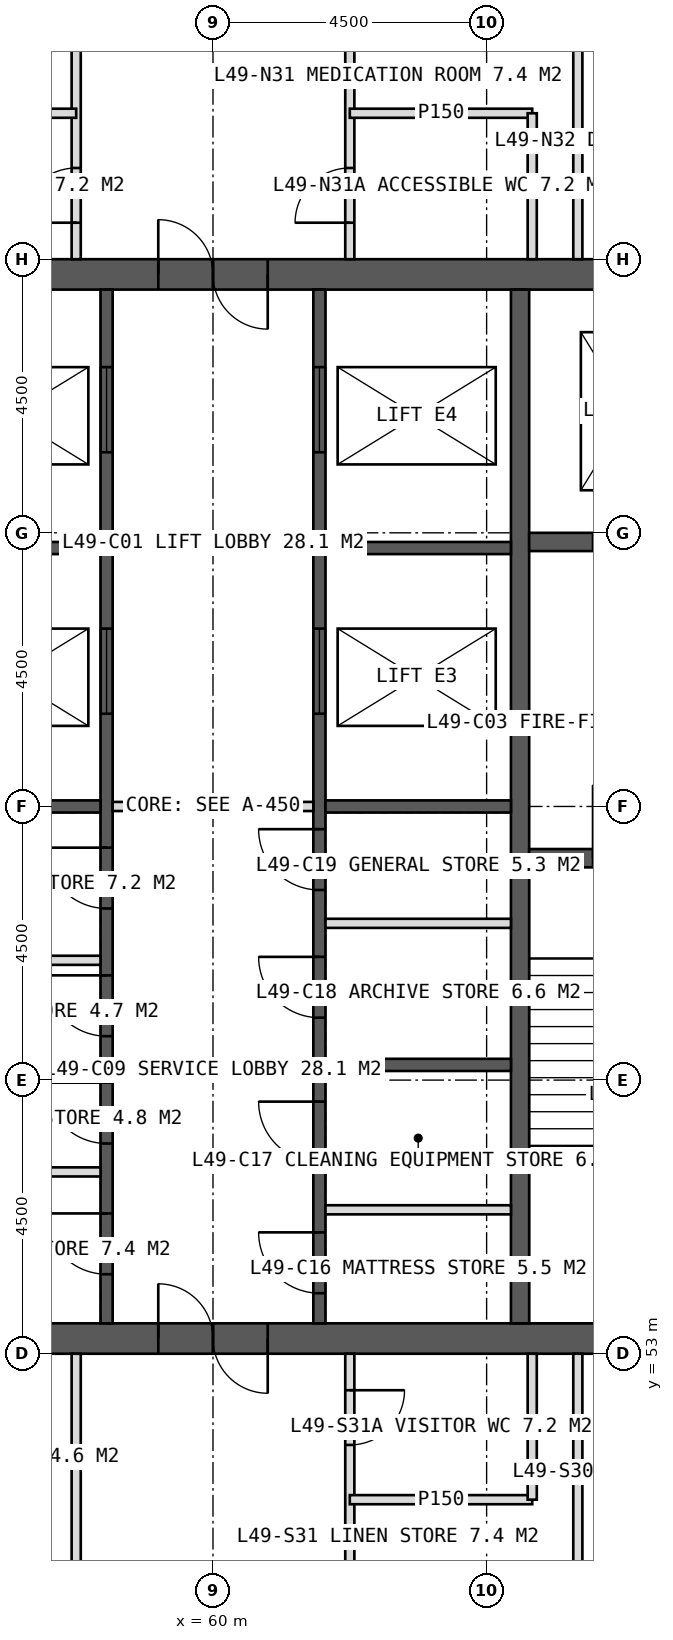
"""IFC4 building model, lengths in metres.
Left out: names, types, materials, properties, quantities, classifications, styles, units other than length and angle.
Written with IfcOpenShell. Run it as: python <this file> out.ifc"""

import sys

from ifc_helpers import new_model, si_unit, direction, frame, frame_2d, origin, place, context, subcontext, project, spatial, rectangle, extrude, element, fill, save


model = new_model("IFC4")
c1 = context("Model", 3, precision=1e-05, world=origin(), true_north=direction((0.0, 1.0)))
c2 = subcontext(c1, "Body", "Model", "MODEL_VIEW")
j1 = project(units=[si_unit("LENGTHUNIT", "METRE"), si_unit("PLANEANGLEUNIT", "RADIAN")], contexts=[c1])
p1 = place(None, origin())
s1 = spatial("IfcSite", under=j1, at=p1, CompositionType="ELEMENT")
p2 = place(p1, origin())
s2 = spatial("IfcBuilding", under=s1, at=p2, CompositionType="ELEMENT")
p3 = place(p2, frame((0.0, 0.0, 205.0)))
s3 = spatial("IfcBuildingStorey", under=s2, at=p3, CompositionType="ELEMENT", Elevation=205.0)
p4 = place(p3, frame((51.0, 70.75, 0.0), z_axis=(0.0, 0.0, 1.0), x_axis=(1.0, 0.0, 0.0)))
e1 = element("IfcWall", 1, at=p4, inside=s3, PredefinedType="SHEAR", context=c2, shape_type="SweptSolid", body=[
    extrude(rectangle(XDim=18.0, YDim=0.5, at=frame_2d((9.0, 0.0))), origin(), (0.0, 0.0, 1.0), 4.0),
])
p5 = place(p4, frame((8.1, 0.0, 0.0)))
e2 = element("IfcOpeningElement", 2, at=p5, cuts=e1, PredefinedType="OPENING", context=c2, shape_type="SweptSolid", body=[
    extrude(rectangle(XDim=1.8, YDim=2.2, at=frame_2d((0.9, 1.1))), frame((0.0, 0.26, 0.0), z_axis=(0.0, -1.0, 0.0), x_axis=(1.0, 0.0, 0.0)), (0.0, 0.0, 1.0), 0.52),
])
p6 = place(p3, frame((51.0, 53.25, 0.0), z_axis=(0.0, 0.0, 1.0), x_axis=(1.0, 0.0, 0.0)))
e3 = element("IfcWall", 3, at=p6, inside=s3, PredefinedType="SHEAR", context=c2, shape_type="SweptSolid", body=[
    extrude(rectangle(XDim=18.0, YDim=0.5, at=frame_2d((9.0, 0.0))), origin(), (0.0, 0.0, 1.0), 4.0),
])
p7 = place(p6, frame((8.1, 0.0, 0.0)))
e4 = element("IfcOpeningElement", 4, at=p7, cuts=e3, PredefinedType="OPENING", context=c2, shape_type="SweptSolid", body=[
    extrude(rectangle(XDim=1.8, YDim=2.2, at=frame_2d((0.9, 1.1))), frame((0.0, 0.26, 0.0), z_axis=(0.0, -1.0, 0.0), x_axis=(1.0, 0.0, 0.0)), (0.0, 0.0, 1.0), 0.52),
])
p8 = place(p3, frame((65.05, 53.5, 0.0), z_axis=(0.0, 0.0, 1.0), x_axis=(0.0, 1.0, 0.0)))
e5 = element("IfcWall", 5, at=p8, inside=s3, PredefinedType="SHEAR", context=c2, shape_type="SweptSolid", body=[
    extrude(rectangle(XDim=17.0, YDim=0.3, at=frame_2d((8.5, 0.0))), origin(), (0.0, 0.0, 1.0), 4.0),
])
p9 = place(p3, frame((58.25, 53.5, 0.0), z_axis=(0.0, 0.0, 1.0), x_axis=(0.0, 1.0, 0.0)))
e6 = element("IfcWall", 6, at=p9, inside=s3, PredefinedType="SHEAR", context=c2, shape_type="SweptSolid", body=[
    extrude(rectangle(XDim=17.0, YDim=0.2, at=frame_2d((8.5, 0.0))), origin(), (0.0, 0.0, 1.0), 4.0),
])
p10 = place(p9, frame((0.808, 0.0, 0.0)))
e7 = element("IfcOpeningElement", 7, at=p10, cuts=e6, PredefinedType="OPENING", context=c2, shape_type="SweptSolid", body=[
    extrude(rectangle(XDim=1.0, YDim=2.1, at=frame_2d((0.5, 1.05))), frame((0.0, 0.11, 0.0), z_axis=(0.0, -1.0, 0.0), x_axis=(1.0, 0.0, 0.0)), (0.0, 0.0, 1.0), 0.22),
])
p11 = place(p9, frame((2.958, 0.0, 0.0)))
e8 = element("IfcOpeningElement", 8, at=p11, cuts=e6, PredefinedType="OPENING", context=c2, shape_type="SweptSolid", body=[
    extrude(rectangle(XDim=1.0, YDim=2.1, at=frame_2d((0.5, 1.05))), frame((0.0, 0.11, 0.0), z_axis=(0.0, -1.0, 0.0), x_axis=(1.0, 0.0, 0.0)), (0.0, 0.0, 1.0), 0.22),
])
p12 = place(p9, frame((4.722, 0.0, 0.0)))
e9 = element("IfcOpeningElement", 9, at=p12, cuts=e6, PredefinedType="OPENING", context=c2, shape_type="SweptSolid", body=[
    extrude(rectangle(XDim=1.0, YDim=2.1, at=frame_2d((0.5, 1.05))), frame((0.0, 0.11, 0.0), z_axis=(0.0, -1.0, 0.0), x_axis=(1.0, 0.0, 0.0)), (0.0, 0.0, 1.0), 0.22),
])
p13 = place(p9, frame((6.823, 0.0, 0.0)))
e10 = element("IfcOpeningElement", 10, at=p13, cuts=e6, PredefinedType="OPENING", context=c2, shape_type="SweptSolid", body=[
    extrude(rectangle(XDim=1.0, YDim=2.1, at=frame_2d((0.5, 1.05))), frame((0.0, 0.11, 0.0), z_axis=(0.0, -1.0, 0.0), x_axis=(1.0, 0.0, 0.0)), (0.0, 0.0, 1.0), 0.22),
])
p14 = place(p9, frame((10.025, 0.0, 0.0)))
e11 = element("IfcOpeningElement", 11, at=p14, cuts=e6, PredefinedType="OPENING", context=c2, shape_type="SweptSolid", body=[
    extrude(rectangle(XDim=1.4, YDim=2.2, at=frame_2d((0.7, 1.1))), frame((0.0, 0.11, 0.0), z_axis=(0.0, -1.0, 0.0), x_axis=(1.0, 0.0, 0.0)), (0.0, 0.0, 1.0), 0.22),
])
p15 = place(p9, frame((14.325, 0.0, 0.0)))
e12 = element("IfcOpeningElement", 12, at=p15, cuts=e6, PredefinedType="OPENING", context=c2, shape_type="SweptSolid", body=[
    extrude(rectangle(XDim=1.4, YDim=2.2, at=frame_2d((0.7, 1.1))), frame((0.0, 0.11, 0.0), z_axis=(0.0, -1.0, 0.0), x_axis=(1.0, 0.0, 0.0)), (0.0, 0.0, 1.0), 0.22),
])
p16 = place(p3, frame((61.75, 53.5, 0.0), z_axis=(0.0, 0.0, 1.0), x_axis=(0.0, 1.0, 0.0)))
e13 = element("IfcWall", 13, at=p16, inside=s3, PredefinedType="SHEAR", context=c2, shape_type="SweptSolid", body=[
    extrude(rectangle(XDim=17.0, YDim=0.2, at=frame_2d((8.5, 0.0))), origin(), (0.0, 0.0, 1.0), 4.0),
])
p17 = place(p16, frame((0.496, 0.0, 0.0)))
e14 = element("IfcOpeningElement", 14, at=p17, cuts=e13, PredefinedType="OPENING", context=c2, shape_type="SweptSolid", body=[
    extrude(rectangle(XDim=1.0, YDim=2.1, at=frame_2d((0.5, 1.05))), frame((0.0, 0.11, 0.0), z_axis=(0.0, -1.0, 0.0), x_axis=(1.0, 0.0, 0.0)), (0.0, 0.0, 1.0), 0.22),
])
p18 = place(p16, frame((2.646, 0.0, 0.0)))
e15 = element("IfcOpeningElement", 15, at=p18, cuts=e13, PredefinedType="OPENING", context=c2, shape_type="SweptSolid", body=[
    extrude(rectangle(XDim=1.0, YDim=2.1, at=frame_2d((0.5, 1.05))), frame((0.0, 0.11, 0.0), z_axis=(0.0, -1.0, 0.0), x_axis=(1.0, 0.0, 0.0)), (0.0, 0.0, 1.0), 0.22),
])
p19 = place(p16, frame((5.027, 0.0, 0.0)))
e16 = element("IfcOpeningElement", 16, at=p19, cuts=e13, PredefinedType="OPENING", context=c2, shape_type="SweptSolid", body=[
    extrude(rectangle(XDim=1.0, YDim=2.1, at=frame_2d((0.5, 1.05))), frame((0.0, 0.11, 0.0), z_axis=(0.0, -1.0, 0.0), x_axis=(1.0, 0.0, 0.0)), (0.0, 0.0, 1.0), 0.22),
])
p20 = place(p16, frame((7.126, 0.0, 0.0)))
e17 = element("IfcOpeningElement", 17, at=p20, cuts=e13, PredefinedType="OPENING", context=c2, shape_type="SweptSolid", body=[
    extrude(rectangle(XDim=1.0, YDim=2.1, at=frame_2d((0.5, 1.05))), frame((0.0, 0.11, 0.0), z_axis=(0.0, -1.0, 0.0), x_axis=(1.0, 0.0, 0.0)), (0.0, 0.0, 1.0), 0.22),
])
p21 = place(p16, frame((10.025, 0.0, 0.0)))
e18 = element("IfcOpeningElement", 18, at=p21, cuts=e13, PredefinedType="OPENING", context=c2, shape_type="SweptSolid", body=[
    extrude(rectangle(XDim=1.4, YDim=2.2, at=frame_2d((0.7, 1.1))), frame((0.0, 0.11, 0.0), z_axis=(0.0, -1.0, 0.0), x_axis=(1.0, 0.0, 0.0)), (0.0, 0.0, 1.0), 0.22),
])
p22 = place(p16, frame((14.325, 0.0, 0.0)))
e19 = element("IfcOpeningElement", 19, at=p22, cuts=e13, PredefinedType="OPENING", context=c2, shape_type="SweptSolid", body=[
    extrude(rectangle(XDim=1.4, YDim=2.2, at=frame_2d((0.7, 1.1))), frame((0.0, 0.11, 0.0), z_axis=(0.0, -1.0, 0.0), x_axis=(1.0, 0.0, 0.0)), (0.0, 0.0, 1.0), 0.22),
])
for number, where, z_axis, x_axis in (
    (20, (55.1, 57.75, 0.0), (0.0, 0.0, 1.0), (1.0, 0.0, 0.0)),
    (21, (61.85, 57.75, 0.0), (0.0, 0.0, 1.0), (1.0, 0.0, 0.0)),
    (22, (55.1, 62.0, 0.0), (0.0, 0.0, 1.0), (1.0, 0.0, 0.0)),
    (23, (61.85, 62.0, 0.0), (0.0, 0.0, 1.0), (1.0, 0.0, 0.0)),
    (24, (55.1, 66.25, 0.0), (0.0, 0.0, 1.0), (1.0, 0.0, 0.0)),
    (25, (61.85, 66.25, 0.0), (0.0, 0.0, 1.0), (1.0, 0.0, 0.0)),
):
    element("IfcWall", number, at=place(p3, frame(where, z_axis=z_axis, x_axis=x_axis)), inside=s3, PredefinedType="SHEAR", context=c2, shape_type="SweptSolid", body=[
        extrude(rectangle(XDim=3.05, YDim=0.2, at=frame_2d((1.525, 0.0))), origin(), (0.0, 0.0, 1.0), 4.0),
    ])
p23 = place(p3, frame((65.2, 61.15, 0.0), z_axis=(0.0, 0.0, 1.0), x_axis=(1.0, 0.0, 0.0)))
e26 = element("IfcWall", 26, at=p23, inside=s3, PredefinedType="SHEAR", context=c2, shape_type="SweptSolid", body=[
    extrude(rectangle(XDim=3.3, YDim=0.3, at=frame_2d((1.65, 0.0))), origin(), (0.0, 0.0, 1.0), 4.0),
])
p24 = place(p23, frame((1.05, 0.0, 0.0)))
e27 = element("IfcOpeningElement", 27, at=p24, cuts=e26, PredefinedType="OPENING", context=c2, shape_type="SweptSolid", body=[
    extrude(rectangle(XDim=1.2, YDim=2.1, at=frame_2d((0.6, 1.05))), frame((0.0, 0.16, 0.0), z_axis=(0.0, -1.0, 0.0), x_axis=(1.0, 0.0, 0.0)), (0.0, 0.0, 1.0), 0.32),
])
p25 = place(p3, frame((65.2, 66.35, 0.0), z_axis=(0.0, 0.0, 1.0), x_axis=(1.0, 0.0, 0.0)))
e28 = element("IfcWall", 28, at=p25, inside=s3, PredefinedType="SHEAR", context=c2, shape_type="SweptSolid", body=[
    extrude(rectangle(XDim=3.3, YDim=0.3, at=frame_2d((1.65, 0.0))), origin(), (0.0, 0.0, 1.0), 4.0),
])
p26 = place(p25, frame((1.05, 0.0, 0.0)))
e29 = element("IfcOpeningElement", 29, at=p26, cuts=e28, PredefinedType="OPENING", context=c2, shape_type="SweptSolid", body=[
    extrude(rectangle(XDim=1.2, YDim=2.2, at=frame_2d((0.6, 1.1))), frame((0.0, 0.16, 0.0), z_axis=(0.0, -1.0, 0.0), x_axis=(1.0, 0.0, 0.0)), (0.0, 0.0, 1.0), 0.32),
])
p27 = place(p3, frame((57.75, 71.0, 0.0), z_axis=(0.0, 0.0, 1.0), x_axis=(0.0, 1.0, 0.0)))
e30 = element("IfcWall", 30, at=p27, inside=s3, PredefinedType="PARTITIONING", context=c2, shape_type="SweptSolid", body=[
    extrude(rectangle(XDim=3.9, YDim=0.15, at=frame_2d((1.95, 0.0))), origin(), (0.0, 0.0, 1.0), 3.75),
])
p28 = place(p27, frame((0.6, 0.0, 0.0)))
e31 = element("IfcOpeningElement", 31, at=p28, cuts=e30, PredefinedType="OPENING", context=c2, shape_type="SweptSolid", body=[
    extrude(rectangle(XDim=0.9, YDim=2.1, at=frame_2d((0.45, 1.05))), frame((0.0, 0.085, 0.0), z_axis=(0.0, -1.0, 0.0), x_axis=(1.0, 0.0, 0.0)), (0.0, 0.0, 1.0), 0.17),
])
p29 = place(p3, frame((62.25, 71.0, 0.0), z_axis=(0.0, 0.0, 1.0), x_axis=(0.0, 1.0, 0.0)))
e32 = element("IfcWall", 32, at=p29, inside=s3, PredefinedType="PARTITIONING", context=c2, shape_type="SweptSolid", body=[
    extrude(rectangle(XDim=3.9, YDim=0.15, at=frame_2d((1.95, 0.0))), origin(), (0.0, 0.0, 1.0), 3.75),
])
p30 = place(p29, frame((0.6, 0.0, 0.0)))
e33 = element("IfcOpeningElement", 33, at=p30, cuts=e32, PredefinedType="OPENING", context=c2, shape_type="SweptSolid", body=[
    extrude(rectangle(XDim=0.9, YDim=2.1, at=frame_2d((0.45, 1.05))), frame((0.0, 0.085, 0.0), z_axis=(0.0, -1.0, 0.0), x_axis=(1.0, 0.0, 0.0)), (0.0, 0.0, 1.0), 0.17),
])
p31 = place(p3, frame((66.0, 71.0, 0.0), z_axis=(0.0, 0.0, 1.0), x_axis=(0.0, 1.0, 0.0)))
e34 = element("IfcWall", 34, at=p31, inside=s3, PredefinedType="PARTITIONING", context=c2, shape_type="SweptSolid", body=[
    extrude(rectangle(XDim=3.9, YDim=0.15, at=frame_2d((1.95, 0.0))), origin(), (0.0, 0.0, 1.0), 3.75),
])
for number, where, z_axis, x_axis in (
    (35, (54.75, 73.4, 0.0), (0.0, 0.0, 1.0), (1.0, 0.0, 0.0)),
    (36, (62.25, 73.4, 0.0), (0.0, 0.0, 1.0), (1.0, 0.0, 0.0)),
):
    element("IfcWall", number, at=place(p3, frame(where, z_axis=z_axis, x_axis=x_axis)), inside=s3, PredefinedType="PARTITIONING", context=c2, shape_type="SweptSolid", body=[
        extrude(rectangle(XDim=3.0, YDim=0.15, at=frame_2d((1.5, 0.0))), origin(), (0.0, 0.0, 1.0), 3.75),
    ])
p32 = place(p3, frame((65.25, 71.0, 0.0), z_axis=(0.0, 0.0, 1.0), x_axis=(0.0, 1.0, 0.0)))
e37 = element("IfcWall", 37, at=p32, inside=s3, PredefinedType="PARTITIONING", context=c2, shape_type="SweptSolid", body=[
    extrude(rectangle(XDim=2.4, YDim=0.15, at=frame_2d((1.2, 0.0))), origin(), (0.0, 0.0, 1.0), 3.75),
])
p33 = place(p3, frame((62.25, 53.0, 0.0), z_axis=(0.0, 0.0, 1.0), x_axis=(0.0, -1.0, 0.0)))
e38 = element("IfcWall", 38, at=p33, inside=s3, PredefinedType="PARTITIONING", context=c2, shape_type="SweptSolid", body=[
    extrude(rectangle(XDim=3.9, YDim=0.15, at=frame_2d((1.95, 0.0))), origin(), (0.0, 0.0, 1.0), 3.75),
])
p34 = place(p33, frame((0.6, 0.0, 0.0)))
e39 = element("IfcOpeningElement", 39, at=p34, cuts=e38, PredefinedType="OPENING", context=c2, shape_type="SweptSolid", body=[
    extrude(rectangle(XDim=0.9, YDim=2.1, at=frame_2d((0.45, 1.05))), frame((0.0, 0.085, 0.0), z_axis=(0.0, -1.0, 0.0), x_axis=(1.0, 0.0, 0.0)), (0.0, 0.0, 1.0), 0.17),
])
for number, where, z_axis, x_axis in (
    (40, (57.75, 53.0, 0.0), (0.0, 0.0, 1.0), (0.0, -1.0, 0.0)),
    (41, (66.0, 53.0, 0.0), (0.0, 0.0, 1.0), (0.0, -1.0, 0.0)),
):
    element("IfcWall", number, at=place(p3, frame(where, z_axis=z_axis, x_axis=x_axis)), inside=s3, PredefinedType="PARTITIONING", context=c2, shape_type="SweptSolid", body=[
        extrude(rectangle(XDim=3.9, YDim=0.15, at=frame_2d((1.95, 0.0))), origin(), (0.0, 0.0, 1.0), 3.75),
    ])
p35 = place(p3, frame((65.25, 50.6, 0.0), z_axis=(0.0, 0.0, 1.0), x_axis=(-1.0, 0.0, 0.0)))
e42 = element("IfcWall", 42, at=p35, inside=s3, PredefinedType="PARTITIONING", context=c2, shape_type="SweptSolid", body=[
    extrude(rectangle(XDim=3.0, YDim=0.15, at=frame_2d((1.5, 0.0))), origin(), (0.0, 0.0, 1.0), 3.75),
])
p36 = place(p3, frame((65.25, 53.0, 0.0), z_axis=(0.0, 0.0, 1.0), x_axis=(0.0, -1.0, 0.0)))
e43 = element("IfcWall", 43, at=p36, inside=s3, PredefinedType="PARTITIONING", context=c2, shape_type="SweptSolid", body=[
    extrude(rectangle(XDim=2.4, YDim=0.15, at=frame_2d((1.2, 0.0))), origin(), (0.0, 0.0, 1.0), 3.75),
])
for number, where, z_axis, x_axis in (
    (44, (55.1, 55.99, 0.0), (0.0, 0.0, 1.0), (1.0, 0.0, 0.0)),
    (45, (61.85, 55.367, 0.0), (0.0, 0.0, 1.0), (1.0, 0.0, 0.0)),
    (46, (55.1, 59.47, 0.0), (0.0, 0.0, 1.0), (1.0, 0.0, 0.0)),
    (47, (61.85, 60.078, 0.0), (0.0, 0.0, 1.0), (1.0, 0.0, 0.0)),
):
    element("IfcWall", number, at=place(p3, frame(where, z_axis=z_axis, x_axis=x_axis)), inside=s3, PredefinedType="PARTITIONING", context=c2, shape_type="SweptSolid", body=[
        extrude(rectangle(XDim=3.05, YDim=0.15, at=frame_2d((1.525, 0.0))), origin(), (0.0, 0.0, 1.0), 3.75),
    ])
p37 = place(p3, frame((58.35, 62.0, 0.0), z_axis=(0.0, 0.0, 1.0), x_axis=(1.0, 0.0, 0.0)))
e48 = element("IfcWall", 48, at=p37, inside=s3, PredefinedType="PARTITIONING", context=c2, shape_type="SweptSolid", body=[
    extrude(rectangle(XDim=3.3, YDim=0.15, at=frame_2d((1.65, 0.0))), origin(), (0.0, 0.0, 1.0), 3.75),
])
p38 = place(p28, origin())
e49 = element("IfcDoor", 49, at=p38, inside=s3, OperationType="SINGLE_SWING_LEFT", PredefinedType="DOOR", context=c2, shape_type="SweptSolid", body=[
    extrude(rectangle(XDim=0.9, YDim=2.1, at=frame_2d((0.45, 1.05))), frame((0.0, 0.025, 0.0), z_axis=(0.0, -1.0, 0.0), x_axis=(1.0, 0.0, 0.0)), (0.0, 0.0, 1.0), 0.05),
])
fill(e31, e49)
p39 = place(p30, origin())
e50 = element("IfcDoor", 50, at=p39, inside=s3, OperationType="SINGLE_SWING_LEFT", PredefinedType="DOOR", context=c2, shape_type="SweptSolid", body=[
    extrude(rectangle(XDim=0.9, YDim=2.1, at=frame_2d((0.45, 1.05))), frame((0.0, 0.025, 0.0), z_axis=(0.0, -1.0, 0.0), x_axis=(1.0, 0.0, 0.0)), (0.0, 0.0, 1.0), 0.05),
])
fill(e33, e50)
p40 = place(p34, origin())
e51 = element("IfcDoor", 51, at=p40, inside=s3, OperationType="SINGLE_SWING_LEFT", PredefinedType="DOOR", context=c2, shape_type="SweptSolid", body=[
    extrude(rectangle(XDim=0.9, YDim=2.1, at=frame_2d((0.45, 1.05))), frame((0.0, 0.025, 0.0), z_axis=(0.0, -1.0, 0.0), x_axis=(1.0, 0.0, 0.0)), (0.0, 0.0, 1.0), 0.05),
])
fill(e39, e51)
p41 = place(p5, origin())
e52 = element("IfcDoor", 52, at=p41, inside=s3, OperationType="DOUBLE_DOOR_SINGLE_SWING", PredefinedType="DOOR", context=c2, shape_type="SweptSolid", body=[
    extrude(rectangle(XDim=1.8, YDim=2.2, at=frame_2d((0.9, 1.1))), frame((0.0, 0.025, 0.0), z_axis=(0.0, -1.0, 0.0), x_axis=(1.0, 0.0, 0.0)), (0.0, 0.0, 1.0), 0.05),
])
fill(e2, e52)
p42 = place(p10, origin())
e53 = element("IfcDoor", 53, at=p42, inside=s3, OperationType="SINGLE_SWING_RIGHT", PredefinedType="DOOR", context=c2, shape_type="SweptSolid", body=[
    extrude(rectangle(XDim=1.0, YDim=2.1, at=frame_2d((0.5, 1.05))), frame((0.0, 0.025, 0.0), z_axis=(0.0, -1.0, 0.0), x_axis=(1.0, 0.0, 0.0)), (0.0, 0.0, 1.0), 0.05),
])
fill(e7, e53)
p43 = place(p11, origin())
e54 = element("IfcDoor", 54, at=p43, inside=s3, OperationType="SINGLE_SWING_RIGHT", PredefinedType="DOOR", context=c2, shape_type="SweptSolid", body=[
    extrude(rectangle(XDim=1.0, YDim=2.1, at=frame_2d((0.5, 1.05))), frame((0.0, 0.025, 0.0), z_axis=(0.0, -1.0, 0.0), x_axis=(1.0, 0.0, 0.0)), (0.0, 0.0, 1.0), 0.05),
])
fill(e8, e54)
p44 = place(p17, origin())
e55 = element("IfcDoor", 55, at=p44, inside=s3, OperationType="SINGLE_SWING_RIGHT", PredefinedType="DOOR", context=c2, shape_type="SweptSolid", body=[
    extrude(rectangle(XDim=1.0, YDim=2.1, at=frame_2d((0.5, 1.05))), frame((0.0, 0.025, 0.0), z_axis=(0.0, -1.0, 0.0), x_axis=(1.0, 0.0, 0.0)), (0.0, 0.0, 1.0), 0.05),
])
fill(e14, e55)
p45 = place(p18, origin())
e56 = element("IfcDoor", 56, at=p45, inside=s3, OperationType="SINGLE_SWING_RIGHT", PredefinedType="DOOR", context=c2, shape_type="SweptSolid", body=[
    extrude(rectangle(XDim=1.0, YDim=2.1, at=frame_2d((0.5, 1.05))), frame((0.0, 0.025, 0.0), z_axis=(0.0, -1.0, 0.0), x_axis=(1.0, 0.0, 0.0)), (0.0, 0.0, 1.0), 0.05),
])
fill(e15, e56)
p46 = place(p12, origin())
e57 = element("IfcDoor", 57, at=p46, inside=s3, OperationType="SINGLE_SWING_RIGHT", PredefinedType="DOOR", context=c2, shape_type="SweptSolid", body=[
    extrude(rectangle(XDim=1.0, YDim=2.1, at=frame_2d((0.5, 1.05))), frame((0.0, 0.025, 0.0), z_axis=(0.0, -1.0, 0.0), x_axis=(1.0, 0.0, 0.0)), (0.0, 0.0, 1.0), 0.05),
])
fill(e9, e57)
p47 = place(p13, origin())
e58 = element("IfcDoor", 58, at=p47, inside=s3, OperationType="SINGLE_SWING_RIGHT", PredefinedType="DOOR", context=c2, shape_type="SweptSolid", body=[
    extrude(rectangle(XDim=1.0, YDim=2.1, at=frame_2d((0.5, 1.05))), frame((0.0, 0.025, 0.0), z_axis=(0.0, -1.0, 0.0), x_axis=(1.0, 0.0, 0.0)), (0.0, 0.0, 1.0), 0.05),
])
fill(e10, e58)
p48 = place(p19, origin())
e59 = element("IfcDoor", 59, at=p48, inside=s3, OperationType="SINGLE_SWING_RIGHT", PredefinedType="DOOR", context=c2, shape_type="SweptSolid", body=[
    extrude(rectangle(XDim=1.0, YDim=2.1, at=frame_2d((0.5, 1.05))), frame((0.0, 0.025, 0.0), z_axis=(0.0, -1.0, 0.0), x_axis=(1.0, 0.0, 0.0)), (0.0, 0.0, 1.0), 0.05),
])
fill(e16, e59)
p49 = place(p20, origin())
e60 = element("IfcDoor", 60, at=p49, inside=s3, OperationType="SINGLE_SWING_RIGHT", PredefinedType="DOOR", context=c2, shape_type="SweptSolid", body=[
    extrude(rectangle(XDim=1.0, YDim=2.1, at=frame_2d((0.5, 1.05))), frame((0.0, 0.025, 0.0), z_axis=(0.0, -1.0, 0.0), x_axis=(1.0, 0.0, 0.0)), (0.0, 0.0, 1.0), 0.05),
])
fill(e17, e60)
p50 = place(p14, origin())
e61 = element("IfcDoor", 61, at=p50, inside=s3, OperationType="SLIDING_TO_LEFT", PredefinedType="DOOR", context=c2, shape_type="SweptSolid", body=[
    extrude(rectangle(XDim=1.4, YDim=2.2, at=frame_2d((0.7, 1.1))), frame((0.0, 0.025, 0.0), z_axis=(0.0, -1.0, 0.0), x_axis=(1.0, 0.0, 0.0)), (0.0, 0.0, 1.0), 0.05),
])
fill(e11, e61)
p51 = place(p21, origin())
e62 = element("IfcDoor", 62, at=p51, inside=s3, OperationType="SLIDING_TO_LEFT", PredefinedType="DOOR", context=c2, shape_type="SweptSolid", body=[
    extrude(rectangle(XDim=1.4, YDim=2.2, at=frame_2d((0.7, 1.1))), frame((0.0, 0.025, 0.0), z_axis=(0.0, -1.0, 0.0), x_axis=(1.0, 0.0, 0.0)), (0.0, 0.0, 1.0), 0.05),
])
fill(e18, e62)
p52 = place(p15, origin())
e63 = element("IfcDoor", 63, at=p52, inside=s3, OperationType="SLIDING_TO_LEFT", PredefinedType="DOOR", context=c2, shape_type="SweptSolid", body=[
    extrude(rectangle(XDim=1.4, YDim=2.2, at=frame_2d((0.7, 1.1))), frame((0.0, 0.025, 0.0), z_axis=(0.0, -1.0, 0.0), x_axis=(1.0, 0.0, 0.0)), (0.0, 0.0, 1.0), 0.05),
])
fill(e12, e63)
p53 = place(p22, origin())
e64 = element("IfcDoor", 64, at=p53, inside=s3, OperationType="SLIDING_TO_LEFT", PredefinedType="DOOR", context=c2, shape_type="SweptSolid", body=[
    extrude(rectangle(XDim=1.4, YDim=2.2, at=frame_2d((0.7, 1.1))), frame((0.0, 0.025, 0.0), z_axis=(0.0, -1.0, 0.0), x_axis=(1.0, 0.0, 0.0)), (0.0, 0.0, 1.0), 0.05),
])
fill(e19, e64)
p54 = place(p7, origin())
e65 = element("IfcDoor", 65, at=p54, inside=s3, OperationType="DOUBLE_DOOR_SINGLE_SWING", PredefinedType="DOOR", context=c2, shape_type="SweptSolid", body=[
    extrude(rectangle(XDim=1.8, YDim=2.2, at=frame_2d((0.9, 1.1))), frame((0.0, 0.025, 0.0), z_axis=(0.0, -1.0, 0.0), x_axis=(1.0, 0.0, 0.0)), (0.0, 0.0, 1.0), 0.05),
])
fill(e4, e65)
save(model, sys.argv[1])
